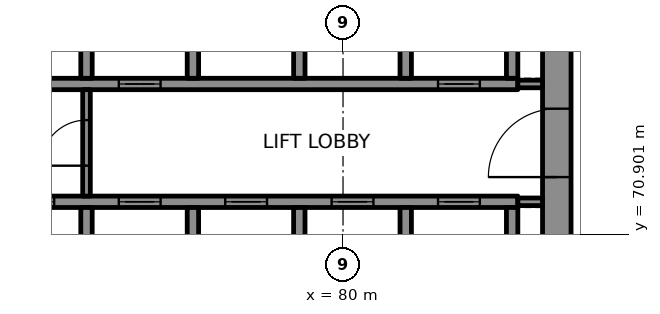
"""IFC4 building model, lengths in metres.
Left out: names, types, materials, properties, quantities, classifications, styles, units other than length and angle.
Written with IfcOpenShell. Run it as: python <this file> out.ifc"""

import sys

from ifc_helpers import new_model, si_unit, direction, frame, frame_2d, origin, place, context, subcontext, project, spatial, rectangle, extrude, element, fill, save


model = new_model("IFC4")
c1 = context("Model", 3, precision=1e-05, world=origin(), true_north=direction((0.0, 1.0)))
c2 = subcontext(c1, "Body", "Model", "MODEL_VIEW")
j1 = project(units=[si_unit("LENGTHUNIT", "METRE"), si_unit("PLANEANGLEUNIT", "RADIAN")], contexts=[c1])
p1 = place(None, origin())
s1 = spatial("IfcSite", under=j1, at=p1, CompositionType="ELEMENT")
p2 = place(p1, origin())
s2 = spatial("IfcBuilding", under=s1, at=p2, CompositionType="ELEMENT")
p3 = place(p2, frame((0.0, 0.0, 194.8)))
s3 = spatial("IfcBuildingStorey", under=s2, at=p3, CompositionType="ELEMENT", Elevation=194.8)
p4 = place(p3, frame((85.625, 67.75, 0.0), z_axis=(0.0, 0.0, 1.0), x_axis=(0.0, 1.0, 0.0)))
e1 = element("IfcWall", 1, at=p4, inside=s3, PredefinedType="SHEAR", context=c2, shape_type="SweptSolid", body=[
    extrude(rectangle(XDim=14.5, YDim=0.75, at=frame_2d((7.25, 0.0))), origin(), (0.0, 0.0, 1.0), 3.7),
])
p5 = place(p4, frame((4.65, 0.0, 0.0)))
e2 = element("IfcOpeningElement", 2, at=p5, cuts=e1, PredefinedType="OPENING", context=c2, shape_type="SweptSolid", body=[
    extrude(rectangle(XDim=1.8, YDim=2.1, at=frame_2d((0.9, 1.05))), frame((0.0, 0.385, 0.0), z_axis=(0.0, -1.0, 0.0), x_axis=(1.0, 0.0, 0.0)), (0.0, 0.0, 1.0), 0.77),
])
p6 = place(p4, frame((11.8, 0.0, 0.0)))
e3 = element("IfcOpeningElement", 3, at=p6, cuts=e1, PredefinedType="OPENING", context=c2, shape_type="SweptSolid", body=[
    extrude(rectangle(XDim=0.9, YDim=2.1, at=frame_2d((0.45, 1.05))), frame((0.0, 0.385, 0.0), z_axis=(0.0, -1.0, 0.0), x_axis=(1.0, 0.0, 0.0)), (0.0, 0.0, 1.0), 0.77),
])
p7 = place(p3, frame((70.3, 71.75, 0.0), z_axis=(0.0, 0.0, 1.0), x_axis=(1.0, 0.0, 0.0)))
e4 = element("IfcWall", 4, at=p7, inside=s3, PredefinedType="SHEAR", context=c2, shape_type="SweptSolid", body=[
    extrude(rectangle(XDim=14.3, YDim=0.3, at=frame_2d((7.15, 0.0))), origin(), (0.0, 0.0, 1.0), 3.7),
])
p8 = place(p7, frame((1.0, 0.0, 0.0)))
e5 = element("IfcOpeningElement", 5, at=p8, cuts=e4, PredefinedType="OPENING", context=c2, shape_type="SweptSolid", body=[
    extrude(rectangle(XDim=1.1, YDim=2.1, at=frame_2d((0.55, 1.05))), frame((0.0, 0.16, 0.0), z_axis=(0.0, -1.0, 0.0), x_axis=(1.0, 0.0, 0.0)), (0.0, 0.0, 1.0), 0.32),
])
p9 = place(p7, frame((3.8, 0.0, 0.0)))
e6 = element("IfcOpeningElement", 6, at=p9, cuts=e4, PredefinedType="OPENING", context=c2, shape_type="SweptSolid", body=[
    extrude(rectangle(XDim=1.1, YDim=2.1, at=frame_2d((0.55, 1.05))), frame((0.0, 0.16, 0.0), z_axis=(0.0, -1.0, 0.0), x_axis=(1.0, 0.0, 0.0)), (0.0, 0.0, 1.0), 0.32),
])
p10 = place(p7, frame((6.6, 0.0, 0.0)))
e7 = element("IfcOpeningElement", 7, at=p10, cuts=e4, PredefinedType="OPENING", context=c2, shape_type="SweptSolid", body=[
    extrude(rectangle(XDim=1.1, YDim=2.1, at=frame_2d((0.55, 1.05))), frame((0.0, 0.16, 0.0), z_axis=(0.0, -1.0, 0.0), x_axis=(1.0, 0.0, 0.0)), (0.0, 0.0, 1.0), 0.32),
])
p11 = place(p7, frame((9.4, 0.0, 0.0)))
e8 = element("IfcOpeningElement", 8, at=p11, cuts=e4, PredefinedType="OPENING", context=c2, shape_type="SweptSolid", body=[
    extrude(rectangle(XDim=1.1, YDim=2.1, at=frame_2d((0.55, 1.05))), frame((0.0, 0.16, 0.0), z_axis=(0.0, -1.0, 0.0), x_axis=(1.0, 0.0, 0.0)), (0.0, 0.0, 1.0), 0.32),
])
p12 = place(p7, frame((12.2, 0.0, 0.0)))
e9 = element("IfcOpeningElement", 9, at=p12, cuts=e4, PredefinedType="OPENING", context=c2, shape_type="SweptSolid", body=[
    extrude(rectangle(XDim=1.1, YDim=2.1, at=frame_2d((0.55, 1.05))), frame((0.0, 0.16, 0.0), z_axis=(0.0, -1.0, 0.0), x_axis=(1.0, 0.0, 0.0)), (0.0, 0.0, 1.0), 0.32),
])
p13 = place(p3, frame((70.3, 74.85, 0.0), z_axis=(0.0, 0.0, 1.0), x_axis=(1.0, 0.0, 0.0)))
e10 = element("IfcWall", 10, at=p13, inside=s3, PredefinedType="SHEAR", context=c2, shape_type="SweptSolid", body=[
    extrude(rectangle(XDim=14.3, YDim=0.3, at=frame_2d((7.15, 0.0))), origin(), (0.0, 0.0, 1.0), 3.7),
])
p14 = place(p13, frame((3.8, 0.0, 0.0)))
e11 = element("IfcOpeningElement", 11, at=p14, cuts=e10, PredefinedType="OPENING", context=c2, shape_type="SweptSolid", body=[
    extrude(rectangle(XDim=1.1, YDim=2.1, at=frame_2d((0.55, 1.05))), frame((0.0, 0.16, 0.0), z_axis=(0.0, -1.0, 0.0), x_axis=(1.0, 0.0, 0.0)), (0.0, 0.0, 1.0), 0.32),
])
p15 = place(p13, frame((12.2, 0.0, 0.0)))
e12 = element("IfcOpeningElement", 12, at=p15, cuts=e10, PredefinedType="OPENING", context=c2, shape_type="SweptSolid", body=[
    extrude(rectangle(XDim=1.1, YDim=2.1, at=frame_2d((0.55, 1.05))), frame((0.0, 0.16, 0.0), z_axis=(0.0, -1.0, 0.0), x_axis=(1.0, 0.0, 0.0)), (0.0, 0.0, 1.0), 0.32),
])
for number, where, z_axis, x_axis in (
    (13, (73.25, 69.0, 0.0), (0.0, 0.0, 1.0), (0.0, 1.0, 0.0)),
    (14, (73.25, 75.0, 0.0), (0.0, 0.0, 1.0), (0.0, 1.0, 0.0)),
    (15, (76.05, 69.0, 0.0), (0.0, 0.0, 1.0), (0.0, 1.0, 0.0)),
    (16, (76.05, 75.0, 0.0), (0.0, 0.0, 1.0), (0.0, 1.0, 0.0)),
    (17, (78.85, 69.0, 0.0), (0.0, 0.0, 1.0), (0.0, 1.0, 0.0)),
    (18, (78.85, 75.0, 0.0), (0.0, 0.0, 1.0), (0.0, 1.0, 0.0)),
    (19, (81.65, 69.0, 0.0), (0.0, 0.0, 1.0), (0.0, 1.0, 0.0)),
    (20, (81.65, 75.0, 0.0), (0.0, 0.0, 1.0), (0.0, 1.0, 0.0)),
    (21, (84.45, 69.0, 0.0), (0.0, 0.0, 1.0), (0.0, 1.0, 0.0)),
    (22, (84.45, 75.0, 0.0), (0.0, 0.0, 1.0), (0.0, 1.0, 0.0)),
):
    element("IfcWall", number, at=place(p3, frame(where, z_axis=z_axis, x_axis=x_axis)), inside=s3, PredefinedType="SHEAR", context=c2, shape_type="SweptSolid", body=[
        extrude(rectangle(XDim=2.6, YDim=0.3, at=frame_2d((1.3, 0.0))), origin(), (0.0, 0.0, 1.0), 3.7),
    ])
for number, where, z_axis, x_axis in (
    (23, (84.6, 71.75, 0.0), (0.0, 0.0, 1.0), (1.0, 0.0, 0.0)),
    (24, (84.6, 74.85, 0.0), (0.0, 0.0, 1.0), (1.0, 0.0, 0.0)),
):
    element("IfcWall", number, at=place(p3, frame(where, z_axis=z_axis, x_axis=x_axis)), inside=s3, PredefinedType="PARTITIONING", context=c2, shape_type="SweptSolid", body=[
        extrude(rectangle(XDim=0.65, YDim=0.2, at=frame_2d((0.325, 0.0))), origin(), (0.0, 0.0, 1.0), 3.7),
    ])
p16 = place(p3, frame((73.25, 71.9, 0.0), z_axis=(0.0, 0.0, 1.0), x_axis=(0.0, 1.0, 0.0)))
e25 = element("IfcWall", 25, at=p16, inside=s3, PredefinedType="PARTITIONING", context=c2, shape_type="SweptSolid", body=[
    extrude(rectangle(XDim=2.8, YDim=0.2, at=frame_2d((1.4, 0.0))), origin(), (0.0, 0.0, 1.0), 3.7),
])
p17 = place(p16, frame((0.8, 0.0, 0.0)))
e26 = element("IfcOpeningElement", 26, at=p17, cuts=e25, PredefinedType="OPENING", context=c2, shape_type="SweptSolid", body=[
    extrude(rectangle(XDim=1.2, YDim=2.1, at=frame_2d((0.6, 1.05))), frame((0.0, 0.11, 0.0), z_axis=(0.0, -1.0, 0.0), x_axis=(1.0, 0.0, 0.0)), (0.0, 0.0, 1.0), 0.22),
])
p18 = place(p8, origin())
e27 = element("IfcDoor", 27, at=p18, inside=s3, OperationType="DOUBLE_DOOR_SLIDING", PredefinedType="DOOR", context=c2, shape_type="SweptSolid", body=[
    extrude(rectangle(XDim=1.1, YDim=2.1, at=frame_2d((0.55, 1.05))), frame((0.0, 0.025, 0.0), z_axis=(0.0, -1.0, 0.0), x_axis=(1.0, 0.0, 0.0)), (0.0, 0.0, 1.0), 0.05),
])
fill(e5, e27)
p19 = place(p9, origin())
e28 = element("IfcDoor", 28, at=p19, inside=s3, OperationType="DOUBLE_DOOR_SLIDING", PredefinedType="DOOR", context=c2, shape_type="SweptSolid", body=[
    extrude(rectangle(XDim=1.1, YDim=2.1, at=frame_2d((0.55, 1.05))), frame((0.0, 0.025, 0.0), z_axis=(0.0, -1.0, 0.0), x_axis=(1.0, 0.0, 0.0)), (0.0, 0.0, 1.0), 0.05),
])
fill(e6, e28)
p20 = place(p10, origin())
e29 = element("IfcDoor", 29, at=p20, inside=s3, OperationType="DOUBLE_DOOR_SLIDING", PredefinedType="DOOR", context=c2, shape_type="SweptSolid", body=[
    extrude(rectangle(XDim=1.1, YDim=2.1, at=frame_2d((0.55, 1.05))), frame((0.0, 0.025, 0.0), z_axis=(0.0, -1.0, 0.0), x_axis=(1.0, 0.0, 0.0)), (0.0, 0.0, 1.0), 0.05),
])
fill(e7, e29)
p21 = place(p11, origin())
e30 = element("IfcDoor", 30, at=p21, inside=s3, OperationType="DOUBLE_DOOR_SLIDING", PredefinedType="DOOR", context=c2, shape_type="SweptSolid", body=[
    extrude(rectangle(XDim=1.1, YDim=2.1, at=frame_2d((0.55, 1.05))), frame((0.0, 0.025, 0.0), z_axis=(0.0, -1.0, 0.0), x_axis=(1.0, 0.0, 0.0)), (0.0, 0.0, 1.0), 0.05),
])
fill(e8, e30)
p22 = place(p12, origin())
e31 = element("IfcDoor", 31, at=p22, inside=s3, OperationType="DOUBLE_DOOR_SLIDING", PredefinedType="DOOR", context=c2, shape_type="SweptSolid", body=[
    extrude(rectangle(XDim=1.1, YDim=2.1, at=frame_2d((0.55, 1.05))), frame((0.0, 0.025, 0.0), z_axis=(0.0, -1.0, 0.0), x_axis=(1.0, 0.0, 0.0)), (0.0, 0.0, 1.0), 0.05),
])
fill(e9, e31)
p23 = place(p14, origin())
e32 = element("IfcDoor", 32, at=p23, inside=s3, OperationType="DOUBLE_DOOR_SLIDING", PredefinedType="DOOR", context=c2, shape_type="SweptSolid", body=[
    extrude(rectangle(XDim=1.1, YDim=2.1, at=frame_2d((0.55, 1.05))), frame((0.0, 0.025, 0.0), z_axis=(0.0, -1.0, 0.0), x_axis=(1.0, 0.0, 0.0)), (0.0, 0.0, 1.0), 0.05),
])
fill(e11, e32)
p24 = place(p15, origin())
e33 = element("IfcDoor", 33, at=p24, inside=s3, OperationType="DOUBLE_DOOR_SLIDING", PredefinedType="DOOR", context=c2, shape_type="SweptSolid", body=[
    extrude(rectangle(XDim=1.1, YDim=2.1, at=frame_2d((0.55, 1.05))), frame((0.0, 0.025, 0.0), z_axis=(0.0, -1.0, 0.0), x_axis=(1.0, 0.0, 0.0)), (0.0, 0.0, 1.0), 0.05),
])
fill(e12, e33)
p25 = place(p17, origin())
e34 = element("IfcDoor", 34, at=p25, inside=s3, OperationType="SINGLE_SWING_LEFT", PredefinedType="DOOR", context=c2, shape_type="SweptSolid", body=[
    extrude(rectangle(XDim=1.2, YDim=2.1, at=frame_2d((0.6, 1.05))), frame((0.0, 0.025, 0.0), z_axis=(0.0, -1.0, 0.0), x_axis=(1.0, 0.0, 0.0)), (0.0, 0.0, 1.0), 0.05),
])
fill(e26, e34)
p26 = place(p5, origin())
e35 = element("IfcDoor", 35, at=p26, inside=s3, OperationType="SINGLE_SWING_RIGHT", PredefinedType="DOOR", context=c2, shape_type="SweptSolid", body=[
    extrude(rectangle(XDim=1.8, YDim=2.1, at=frame_2d((0.9, 1.05))), frame((0.0, 0.095, 0.0), z_axis=(0.0, -1.0, 0.0), x_axis=(1.0, 0.0, 0.0)), (0.0, 0.0, 1.0), 0.19),
])
fill(e2, e35)
save(model, sys.argv[1])
